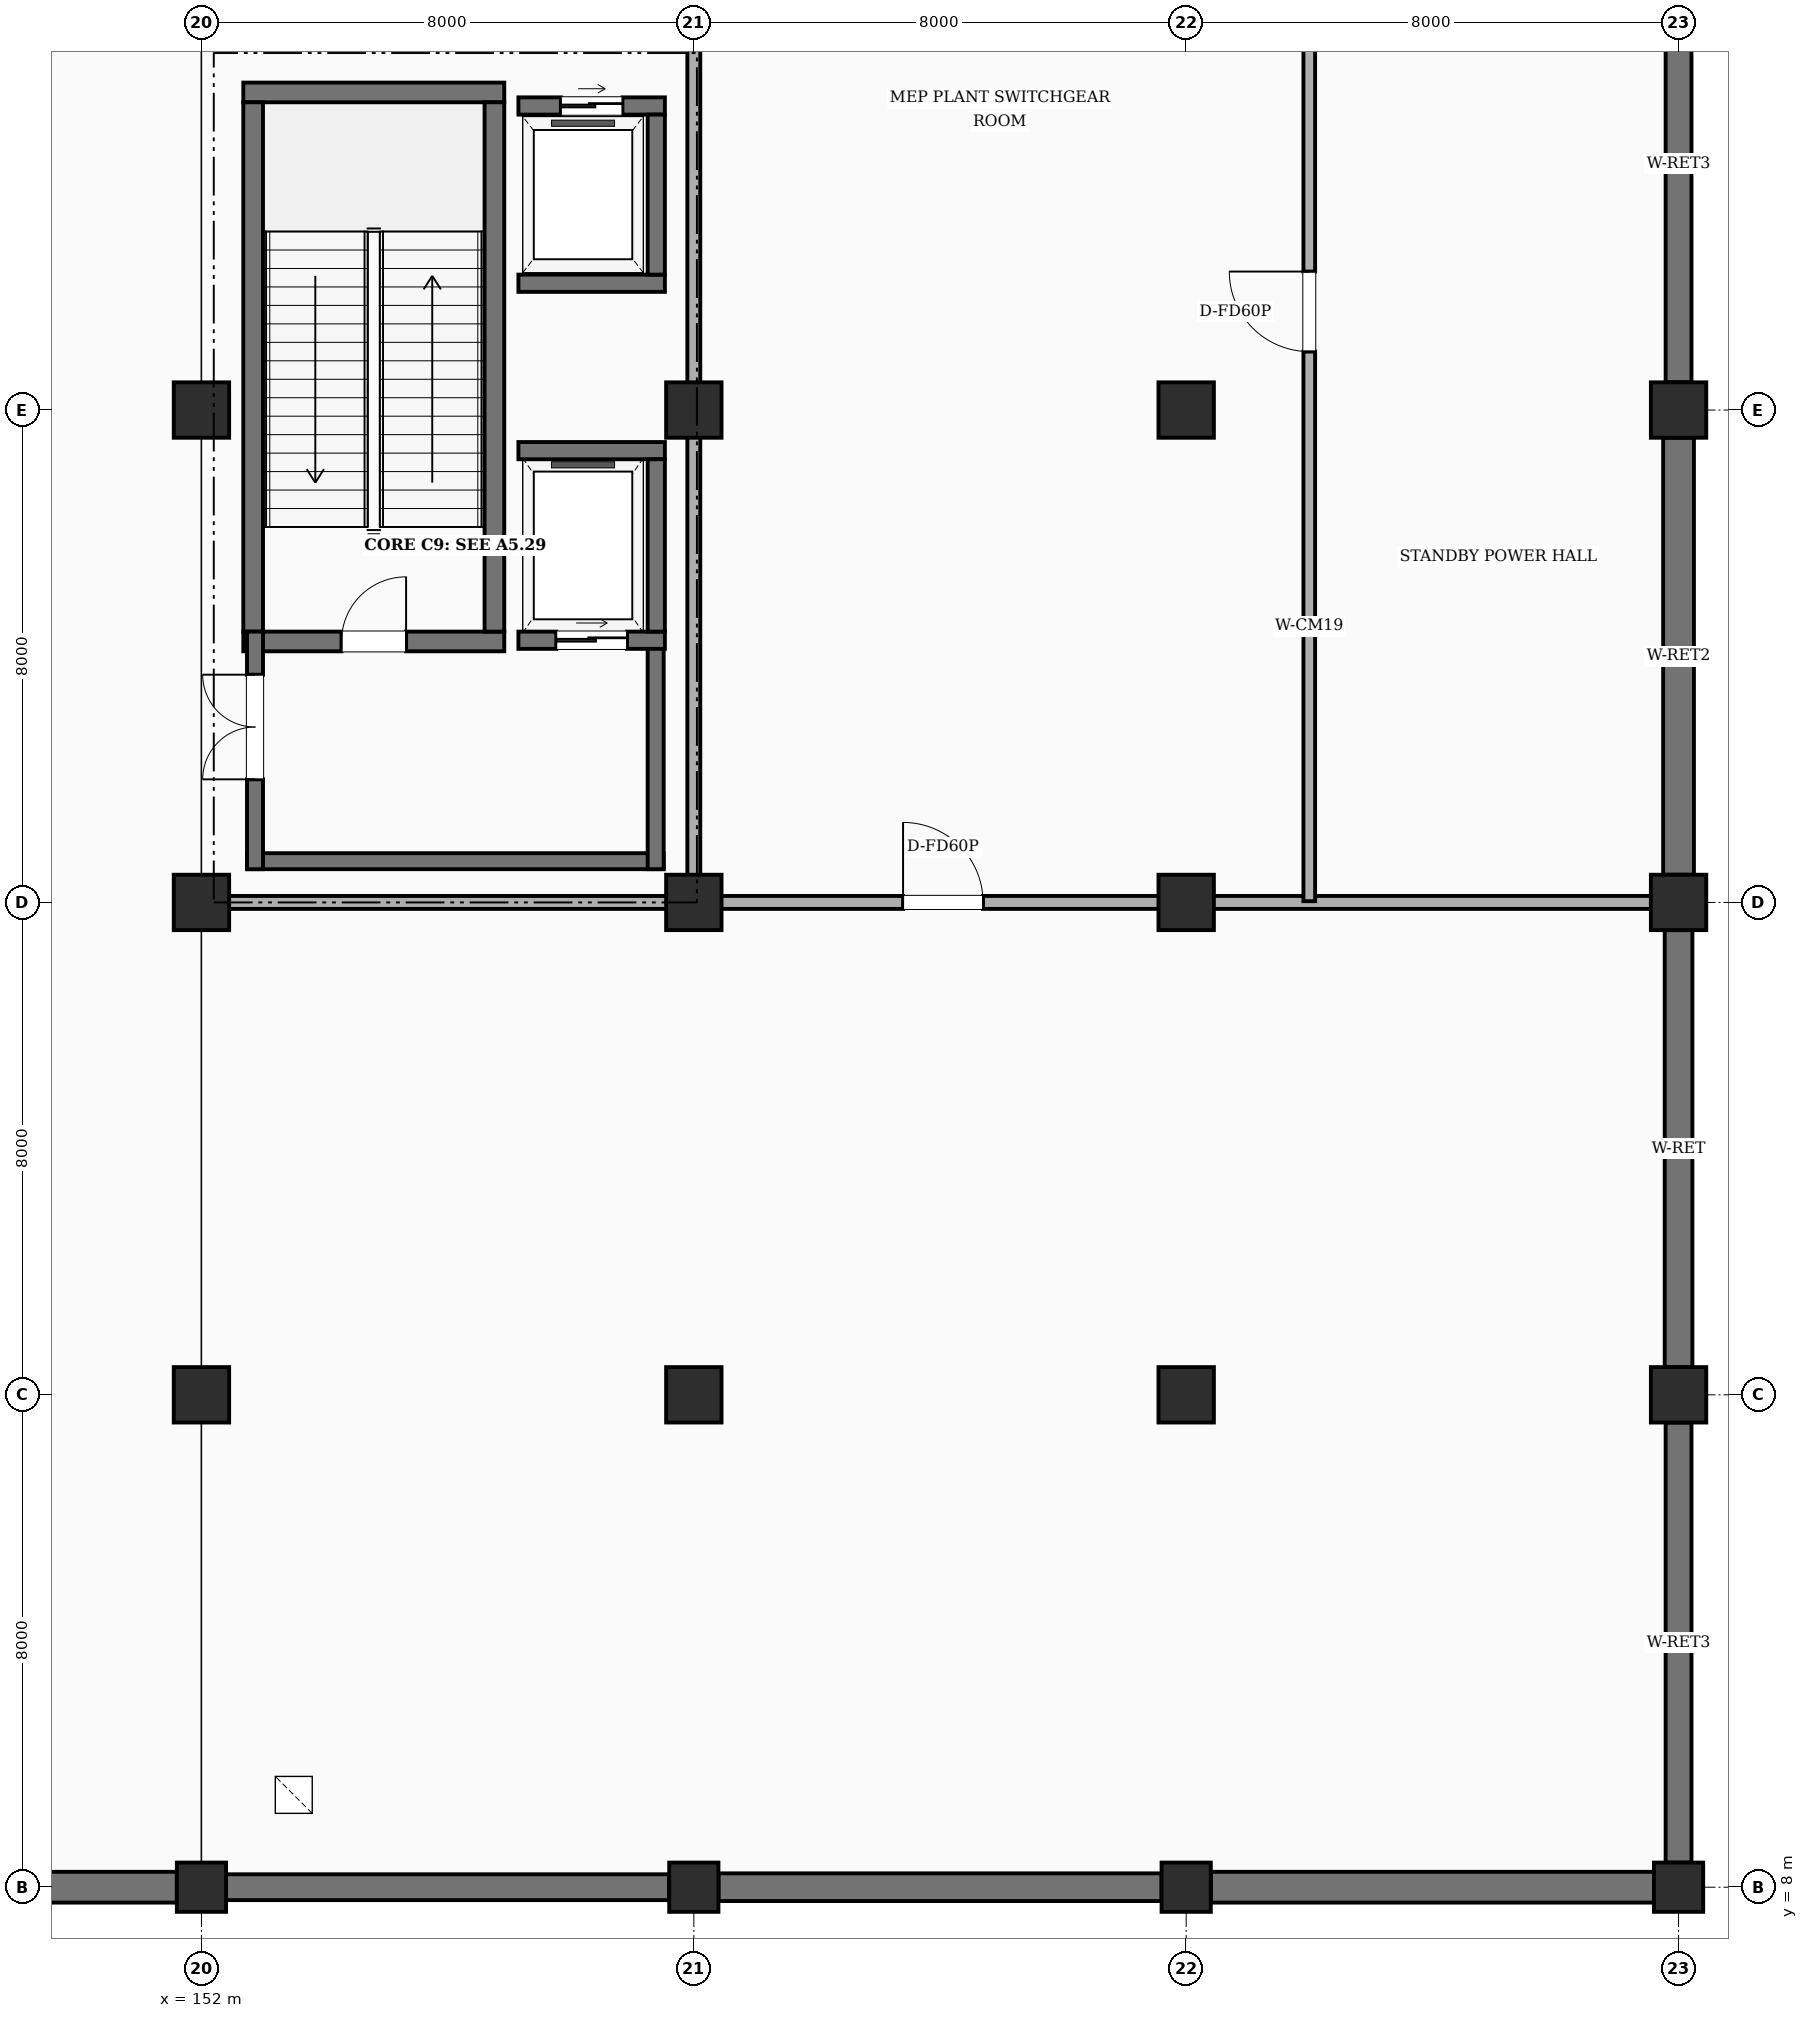
"""IFC4 building model, lengths in metres.
Left out: names, types, materials, properties, quantities, classifications, styles, units other than length and angle.
Written with IfcOpenShell. Run it as: python <this file> out.ifc"""

import sys

from ifc_helpers import new_model, si_unit, direction, frame, frame_2d, origin, origin_2d, place, context, subcontext, project, spatial, rectangle, extrude, element, fill, save


model = new_model("IFC4")
c1 = context("Model", 3, precision=1e-05, world=origin(), true_north=direction((0.0, 1.0)))
c2 = subcontext(c1, "Body", "Model", "MODEL_VIEW")
j1 = project(units=[si_unit("LENGTHUNIT", "METRE"), si_unit("PLANEANGLEUNIT", "RADIAN")], contexts=[c1])
p1 = place(None, origin())
s1 = spatial("IfcSite", under=j1, at=p1, CompositionType="ELEMENT")
p2 = place(p1, origin())
s2 = spatial("IfcBuilding", under=s1, at=p2, CompositionType="ELEMENT")
p3 = place(p2, frame((0.0, 0.0, -5.4)))
s3 = spatial("IfcBuildingStorey", under=s2, at=p3, CompositionType="ELEMENT", Elevation=-5.4)
p4 = place(p3, frame((152.0, 8.0, -0.4), z_axis=(0.0, 0.0, 1.0), x_axis=(1.0, 0.0, 0.0)))
e1 = element("IfcColumn", 1, at=p4, inside=s3, PredefinedType="COLUMN", context=c2, shape_type="SweptSolid", body=[
    extrude(rectangle(XDim=0.8, YDim=0.8, at=origin_2d()), origin(), (0.0, 0.0, 1.0), 5.8),
])
for number, where, z_axis, x_axis in (
    (2, (152.0, 16.0, -0.4), (0.0, 0.0, 1.0), (1.0, 0.0, 0.0)),
    (3, (152.0, 24.0, -0.4), (0.0, 0.0, 1.0), (1.0, 0.0, 0.0)),
    (4, (152.0, 32.0, -0.4), (0.0, 0.0, 1.0), (1.0, 0.0, 0.0)),
):
    element("IfcColumn", number, at=place(p3, frame(where, z_axis=z_axis, x_axis=x_axis)), inside=s3, PredefinedType="COLUMN", context=c2, shape_type="SweptSolid", body=[
        extrude(rectangle(XDim=0.9, YDim=0.9, at=origin_2d()), origin(), (0.0, 0.0, 1.0), 5.8),
    ])
p5 = place(p3, frame((160.0, 8.0, -0.4), z_axis=(0.0, 0.0, 1.0), x_axis=(1.0, 0.0, 0.0)))
e5 = element("IfcColumn", 5, at=p5, inside=s3, PredefinedType="COLUMN", context=c2, shape_type="SweptSolid", body=[
    extrude(rectangle(XDim=0.8, YDim=0.8, at=origin_2d()), origin(), (0.0, 0.0, 1.0), 5.8),
])
for number, where, z_axis, x_axis in (
    (6, (160.0, 16.0, -0.4), (0.0, 0.0, 1.0), (1.0, 0.0, 0.0)),
    (7, (160.0, 24.0, -0.4), (0.0, 0.0, 1.0), (1.0, 0.0, 0.0)),
    (8, (160.0, 32.0, -0.4), (0.0, 0.0, 1.0), (1.0, 0.0, 0.0)),
):
    element("IfcColumn", number, at=place(p3, frame(where, z_axis=z_axis, x_axis=x_axis)), inside=s3, PredefinedType="COLUMN", context=c2, shape_type="SweptSolid", body=[
        extrude(rectangle(XDim=0.9, YDim=0.9, at=origin_2d()), origin(), (0.0, 0.0, 1.0), 5.8),
    ])
p6 = place(p3, frame((168.0, 8.0, -0.4), z_axis=(0.0, 0.0, 1.0), x_axis=(1.0, 0.0, 0.0)))
e9 = element("IfcColumn", 9, at=p6, inside=s3, PredefinedType="COLUMN", context=c2, shape_type="SweptSolid", body=[
    extrude(rectangle(XDim=0.8, YDim=0.8, at=origin_2d()), origin(), (0.0, 0.0, 1.0), 5.8),
])
for number, where, z_axis, x_axis in (
    (10, (168.0, 16.0, -0.4), (0.0, 0.0, 1.0), (1.0, 0.0, 0.0)),
    (11, (168.0, 24.0, -0.4), (0.0, 0.0, 1.0), (1.0, 0.0, 0.0)),
    (12, (168.0, 32.0, -0.4), (0.0, 0.0, 1.0), (1.0, 0.0, 0.0)),
):
    element("IfcColumn", number, at=place(p3, frame(where, z_axis=z_axis, x_axis=x_axis)), inside=s3, PredefinedType="COLUMN", context=c2, shape_type="SweptSolid", body=[
        extrude(rectangle(XDim=0.9, YDim=0.9, at=origin_2d()), origin(), (0.0, 0.0, 1.0), 5.8),
    ])
p7 = place(p3, frame((176.0, 8.0, -0.4), z_axis=(0.0, 0.0, 1.0), x_axis=(1.0, 0.0, 0.0)))
e13 = element("IfcColumn", 13, at=p7, inside=s3, PredefinedType="COLUMN", context=c2, shape_type="SweptSolid", body=[
    extrude(rectangle(XDim=0.8, YDim=0.8, at=origin_2d()), origin(), (0.0, 0.0, 1.0), 5.8),
])
for number, where, z_axis, x_axis in (
    (14, (176.0, 16.0, -0.4), (0.0, 0.0, 1.0), (1.0, 0.0, 0.0)),
    (15, (176.0, 24.0, -0.4), (0.0, 0.0, 1.0), (1.0, 0.0, 0.0)),
    (16, (176.0, 32.0, -0.4), (0.0, 0.0, 1.0), (1.0, 0.0, 0.0)),
):
    element("IfcColumn", number, at=place(p3, frame(where, z_axis=z_axis, x_axis=x_axis)), inside=s3, PredefinedType="COLUMN", context=c2, shape_type="SweptSolid", body=[
        extrude(rectangle(XDim=0.9, YDim=0.9, at=origin_2d()), origin(), (0.0, 0.0, 1.0), 5.8),
    ])
p8 = place(p3, frame((176.0, 8.4, 0.0), z_axis=(0.0, 0.0, 1.0), x_axis=(0.0, 1.0, 0.0)))
e17 = element("IfcWall", 17, at=p8, inside=s3, PredefinedType="USERDEFINED", context=c2, shape_type="SweptSolid", body=[
    extrude(rectangle(XDim=7.15, YDim=0.42, at=frame_2d((3.575, 0.0))), origin(), (0.0, 0.0, 1.0), 4.36),
])
p9 = place(p3, frame((176.0, 16.45, 0.0), z_axis=(0.0, 0.0, 1.0), x_axis=(0.0, 1.0, 0.0)))
e18 = element("IfcWall", 18, at=p9, inside=s3, PredefinedType="USERDEFINED", context=c2, shape_type="SweptSolid", body=[
    extrude(rectangle(XDim=7.1, YDim=0.45, at=frame_2d((3.55, 0.0))), origin(), (0.0, 0.0, 1.0), 4.36),
])
p10 = place(p3, frame((176.0, 24.45, 0.0), z_axis=(0.0, 0.0, 1.0), x_axis=(0.0, 1.0, 0.0)))
e19 = element("IfcWall", 19, at=p10, inside=s3, PredefinedType="USERDEFINED", context=c2, shape_type="SweptSolid", body=[
    extrude(rectangle(XDim=7.1, YDim=0.5, at=frame_2d((3.55, 0.0))), origin(), (0.0, 0.0, 1.0), 4.36),
])
p11 = place(p3, frame((176.0, 32.45, 0.0), z_axis=(0.0, 0.0, 1.0), x_axis=(0.0, 1.0, 0.0)))
e20 = element("IfcWall", 20, at=p11, inside=s3, PredefinedType="USERDEFINED", context=c2, shape_type="SweptSolid", body=[
    extrude(rectangle(XDim=7.1, YDim=0.42, at=frame_2d((3.55, 0.0))), origin(), (0.0, 0.0, 1.0), 4.36),
])
p12 = place(p3, frame((144.4, 8.0, 0.0), z_axis=(0.0, 0.0, 1.0), x_axis=(1.0, 0.0, 0.0)))
e21 = element("IfcWall", 21, at=p12, inside=s3, PredefinedType="USERDEFINED", context=c2, shape_type="SweptSolid", body=[
    extrude(rectangle(XDim=7.2, YDim=0.5, at=frame_2d((3.6, 0.0))), origin(), (0.0, 0.0, 1.0), 5.0),
])
p13 = place(p3, frame((152.4, 8.0, 0.0), z_axis=(0.0, 0.0, 1.0), x_axis=(1.0, 0.0, 0.0)))
e22 = element("IfcWall", 22, at=p13, inside=s3, PredefinedType="USERDEFINED", context=c2, shape_type="SweptSolid", body=[
    extrude(rectangle(XDim=7.2, YDim=0.42, at=frame_2d((3.6, 0.0))), origin(), (0.0, 0.0, 1.0), 4.36),
])
p14 = place(p3, frame((160.4, 8.0, 0.0), z_axis=(0.0, 0.0, 1.0), x_axis=(1.0, 0.0, 0.0)))
e23 = element("IfcWall", 23, at=p14, inside=s3, PredefinedType="USERDEFINED", context=c2, shape_type="SweptSolid", body=[
    extrude(rectangle(XDim=7.2, YDim=0.45, at=frame_2d((3.6, 0.0))), origin(), (0.0, 0.0, 1.0), 4.36),
])
p15 = place(p3, frame((168.4, 8.0, 0.0), z_axis=(0.0, 0.0, 1.0), x_axis=(1.0, 0.0, 0.0)))
e24 = element("IfcWall", 24, at=p15, inside=s3, PredefinedType="USERDEFINED", context=c2, shape_type="SweptSolid", body=[
    extrude(rectangle(XDim=7.2, YDim=0.5, at=frame_2d((3.6, 0.0))), origin(), (0.0, 0.0, 1.0), 4.36),
])
p16 = place(p3, frame((152.68, 28.24, 0.0), z_axis=(0.0, 0.0, 1.0), x_axis=(1.0, 0.0, 0.0)))
e25 = element("IfcWall", 25, at=p16, inside=s3, PredefinedType="SHEAR", context=c2, shape_type="SweptSolid", body=[
    extrude(rectangle(XDim=4.24, YDim=0.32, at=frame_2d((2.12, 0.0))), origin(), (0.0, 0.0, 1.0), 5.4),
])
p17 = place(p16, frame((1.595, 0.0, 0.0)))
e26 = element("IfcOpeningElement", 26, at=p17, cuts=e25, PredefinedType="OPENING", context=c2, shape_type="SweptSolid", body=[
    extrude(rectangle(XDim=1.05, YDim=2.15, at=frame_2d((0.525, 1.075))), frame((0.0, 0.17, 0.0), z_axis=(0.0, -1.0, 0.0), x_axis=(1.0, 0.0, 0.0)), (0.0, 0.0, 1.0), 0.34),
])
p18 = place(p3, frame((152.68, 37.16, 0.0), z_axis=(0.0, 0.0, 1.0), x_axis=(1.0, 0.0, 0.0)))
e27 = element("IfcWall", 27, at=p18, inside=s3, PredefinedType="SHEAR", context=c2, shape_type="SweptSolid", body=[
    extrude(rectangle(XDim=4.24, YDim=0.32, at=frame_2d((2.12, 0.0))), origin(), (0.0, 0.0, 1.0), 5.4),
])
for number, where, z_axis, x_axis in (
    (28, (152.84, 28.4, 0.0), (0.0, 0.0, 1.0), (0.0, 1.0, 0.0)),
    (29, (156.76, 28.4, 0.0), (0.0, 0.0, 1.0), (0.0, 1.0, 0.0)),
):
    element("IfcWall", number, at=place(p3, frame(where, z_axis=z_axis, x_axis=x_axis)), inside=s3, PredefinedType="SHEAR", context=c2, shape_type="SweptSolid", body=[
        extrude(rectangle(XDim=8.6, YDim=0.32, at=frame_2d((4.3, 0.0))), origin(), (0.0, 0.0, 1.0), 5.4),
    ])
p19 = place(p3, frame((159.51, 24.67, 0.0), z_axis=(0.0, 0.0, 1.0), x_axis=(-1.0, 0.0, 0.0)))
e30 = element("IfcWall", 30, at=p19, inside=s3, PredefinedType="SHEAR", context=c2, shape_type="SweptSolid", body=[
    extrude(rectangle(XDim=6.77, YDim=0.26, at=frame_2d((3.385, 0.0))), origin(), (0.0, 0.0, 1.0), 5.4),
])
p20 = place(p3, frame((152.87, 24.54, 0.0), z_axis=(0.0, 0.0, 1.0), x_axis=(0.0, 1.0, 0.0)))
e31 = element("IfcWall", 31, at=p20, inside=s3, PredefinedType="SHEAR", context=c2, shape_type="SweptSolid", body=[
    extrude(rectangle(XDim=3.86, YDim=0.26, at=frame_2d((1.93, 0.0))), origin(), (0.0, 0.0, 1.0), 5.4),
])
p21 = place(p20, frame((1.46, 0.0, 0.0)))
e32 = element("IfcOpeningElement", 32, at=p21, cuts=e31, PredefinedType="OPENING", context=c2, shape_type="SweptSolid", body=[
    extrude(rectangle(XDim=1.7, YDim=2.2, at=frame_2d((0.85, 1.1))), frame((0.0, 0.14, 0.0), z_axis=(0.0, -1.0, 0.0), x_axis=(1.0, 0.0, 0.0)), (0.0, 0.0, 1.0), 0.28),
])
p22 = place(p3, frame((159.38, 24.54, 0.0), z_axis=(0.0, 0.0, 1.0), x_axis=(0.0, 1.0, 0.0)))
e33 = element("IfcWall", 33, at=p22, inside=s3, PredefinedType="SHEAR", context=c2, shape_type="SweptSolid", body=[
    extrude(rectangle(XDim=3.86, YDim=0.26, at=frame_2d((1.93, 0.0))), origin(), (0.0, 0.0, 1.0), 5.4),
])
p23 = place(p3, frame((157.15, 28.26, 0.0), z_axis=(0.0, 0.0, 1.0), x_axis=(1.0, 0.0, 0.0)))
e34 = element("IfcWall", 34, at=p23, inside=s3, PredefinedType="SHEAR", context=c2, shape_type="SweptSolid", body=[
    extrude(rectangle(XDim=2.38, YDim=0.28, at=frame_2d((1.19, 0.0))), origin(), (0.0, 0.0, 1.0), 5.4),
])
p24 = place(p23, frame((0.615, 0.0, 0.0)))
e35 = element("IfcOpeningElement", 35, at=p24, cuts=e34, PredefinedType="OPENING", context=c2, shape_type="SweptSolid", body=[
    extrude(rectangle(XDim=1.15, YDim=2.2, at=frame_2d((0.575, 1.1))), frame((0.0, 0.15, 0.0), z_axis=(0.0, -1.0, 0.0), x_axis=(1.0, 0.0, 0.0)), (0.0, 0.0, 1.0), 0.3),
])
p25 = place(p3, frame((157.15, 31.34, 0.0), z_axis=(0.0, 0.0, 1.0), x_axis=(1.0, 0.0, 0.0)))
e36 = element("IfcWall", 36, at=p25, inside=s3, PredefinedType="SHEAR", context=c2, shape_type="SweptSolid", body=[
    extrude(rectangle(XDim=2.38, YDim=0.28, at=frame_2d((1.19, 0.0))), origin(), (0.0, 0.0, 1.0), 5.4),
])
p26 = place(p3, frame((159.39, 28.4, 0.0), z_axis=(0.0, 0.0, 1.0), x_axis=(0.0, 1.0, 0.0)))
e37 = element("IfcWall", 37, at=p26, inside=s3, PredefinedType="SHEAR", context=c2, shape_type="SweptSolid", body=[
    extrude(rectangle(XDim=2.8, YDim=0.28, at=frame_2d((1.4, 0.0))), origin(), (0.0, 0.0, 1.0), 5.4),
])
p27 = place(p3, frame((157.15, 34.06, 0.0), z_axis=(0.0, 0.0, 1.0), x_axis=(1.0, 0.0, 0.0)))
e38 = element("IfcWall", 38, at=p27, inside=s3, PredefinedType="SHEAR", context=c2, shape_type="SweptSolid", body=[
    extrude(rectangle(XDim=2.38, YDim=0.28, at=frame_2d((1.19, 0.0))), origin(), (0.0, 0.0, 1.0), 5.4),
])
p28 = place(p3, frame((157.15, 36.94, 0.0), z_axis=(0.0, 0.0, 1.0), x_axis=(1.0, 0.0, 0.0)))
e39 = element("IfcWall", 39, at=p28, inside=s3, PredefinedType="SHEAR", context=c2, shape_type="SweptSolid", body=[
    extrude(rectangle(XDim=2.38, YDim=0.28, at=frame_2d((1.19, 0.0))), origin(), (0.0, 0.0, 1.0), 5.4),
])
p29 = place(p28, frame((0.69, 0.0, 0.0)))
e40 = element("IfcOpeningElement", 40, at=p29, cuts=e39, PredefinedType="OPENING", context=c2, shape_type="SweptSolid", body=[
    extrude(rectangle(XDim=1.0, YDim=2.15, at=frame_2d((0.5, 1.075))), frame((0.0, 0.15, 0.0), z_axis=(0.0, -1.0, 0.0), x_axis=(1.0, 0.0, 0.0)), (0.0, 0.0, 1.0), 0.3),
])
p30 = place(p3, frame((159.39, 34.2, 0.0), z_axis=(0.0, 0.0, 1.0), x_axis=(0.0, 1.0, 0.0)))
e41 = element("IfcWall", 41, at=p30, inside=s3, PredefinedType="SHEAR", context=c2, shape_type="SweptSolid", body=[
    extrude(rectangle(XDim=2.6, YDim=0.28, at=frame_2d((1.3, 0.0))), origin(), (0.0, 0.0, 1.0), 5.4),
])
p31 = place(p3, frame((152.22, 24.0, 0.0), z_axis=(0.0, 0.0, 1.0), x_axis=(1.0, 0.0, 0.0)))
e42 = element("IfcWall", 42, at=p31, inside=s3, PredefinedType="SOLIDWALL", context=c2, shape_type="SweptSolid", body=[
    extrude(rectangle(XDim=23.66, YDim=0.21, at=frame_2d((11.83, 0.0))), origin(), (0.0, 0.0, 1.0), 4.11),
])
p32 = place(p31, frame((11.18, 0.0, 0.0)))
e43 = element("IfcOpeningElement", 43, at=p32, cuts=e42, PredefinedType="OPENING", context=c2, shape_type="SweptSolid", body=[
    extrude(rectangle(XDim=1.3, YDim=2.2, at=frame_2d((0.65, 1.1))), frame((0.0, 0.115, 0.0), z_axis=(0.0, -1.0, 0.0), x_axis=(1.0, 0.0, 0.0)), (0.0, 0.0, 1.0), 0.23),
])
p33 = place(p3, frame((170.0, 24.02, 0.0), z_axis=(0.0, 0.0, 1.0), x_axis=(0.0, 1.0, 0.0)))
e44 = element("IfcWall", 44, at=p33, inside=s3, PredefinedType="SOLIDWALL", context=c2, shape_type="SweptSolid", body=[
    extrude(rectangle(XDim=19.16, YDim=0.19, at=frame_2d((9.58, 0.0))), origin(), (0.0, 0.0, 1.0), 4.11),
])
p34 = place(p33, frame((8.93, 0.0, 0.0)))
e45 = element("IfcOpeningElement", 45, at=p34, cuts=e44, PredefinedType="OPENING", context=c2, shape_type="SweptSolid", body=[
    extrude(rectangle(XDim=1.3, YDim=2.2, at=frame_2d((0.65, 1.1))), frame((0.0, 0.105, 0.0), z_axis=(0.0, -1.0, 0.0), x_axis=(1.0, 0.0, 0.0)), (0.0, 0.0, 1.0), 0.21),
])
p35 = place(p3, frame((160.0, 24.02, 0.0), z_axis=(0.0, 0.0, 1.0), x_axis=(0.0, 1.0, 0.0)))
e46 = element("IfcWall", 46, at=p35, inside=s3, PredefinedType="SOLIDWALL", context=c2, shape_type="SweptSolid", body=[
    extrude(rectangle(XDim=19.16, YDim=0.21, at=frame_2d((9.58, 0.0))), origin(), (0.0, 0.0, 1.0), 4.11),
])
p36 = place(p17, origin())
e47 = element("IfcDoor", 47, at=p36, inside=s3, OperationType="SINGLE_SWING_RIGHT", PredefinedType="DOOR", context=c2, shape_type="SweptSolid", body=[
    extrude(rectangle(XDim=1.05, YDim=2.15, at=frame_2d((0.525, 1.075))), frame((0.0, 0.025, 0.0), z_axis=(0.0, -1.0, 0.0), x_axis=(1.0, 0.0, 0.0)), (0.0, 0.0, 1.0), 0.05),
])
fill(e26, e47)
p37 = place(p21, origin())
e48 = element("IfcDoor", 48, at=p37, inside=s3, OperationType="DOUBLE_DOOR_SINGLE_SWING", PredefinedType="DOOR", context=c2, shape_type="SweptSolid", body=[
    extrude(rectangle(XDim=1.7, YDim=2.2, at=frame_2d((0.85, 1.1))), frame((0.0, 0.025, 0.0), z_axis=(0.0, -1.0, 0.0), x_axis=(1.0, 0.0, 0.0)), (0.0, 0.0, 1.0), 0.05),
])
fill(e32, e48)
p38 = place(p24, origin())
e49 = element("IfcDoor", 49, at=p38, inside=s3, OperationType="SLIDING_TO_LEFT", PredefinedType="DOOR", context=c2, shape_type="SweptSolid", body=[
    extrude(rectangle(XDim=1.15, YDim=2.2, at=frame_2d((0.575, 1.1))), frame((0.0, 0.025, 0.0), z_axis=(0.0, -1.0, 0.0), x_axis=(1.0, 0.0, 0.0)), (0.0, 0.0, 1.0), 0.05),
])
fill(e35, e49)
p39 = place(p29, origin())
e50 = element("IfcDoor", 50, at=p39, inside=s3, OperationType="SLIDING_TO_LEFT", PredefinedType="DOOR", context=c2, shape_type="SweptSolid", body=[
    extrude(rectangle(XDim=1.0, YDim=2.15, at=frame_2d((0.5, 1.075))), frame((0.0, 0.025, 0.0), z_axis=(0.0, -1.0, 0.0), x_axis=(1.0, 0.0, 0.0)), (0.0, 0.0, 1.0), 0.05),
])
fill(e40, e50)
p40 = place(p32, origin())
e51 = element("IfcDoor", 51, at=p40, inside=s3, OperationType="SINGLE_SWING_LEFT", PredefinedType="DOOR", context=c2, shape_type="SweptSolid", body=[
    extrude(rectangle(XDim=1.3, YDim=2.2, at=frame_2d((0.65, 1.1))), frame((0.0, 0.025, 0.0), z_axis=(0.0, -1.0, 0.0), x_axis=(1.0, 0.0, 0.0)), (0.0, 0.0, 1.0), 0.05),
])
fill(e43, e51)
p41 = place(p34, origin())
e52 = element("IfcDoor", 52, at=p41, inside=s3, OperationType="SINGLE_SWING_RIGHT", PredefinedType="DOOR", context=c2, shape_type="SweptSolid", body=[
    extrude(rectangle(XDim=1.3, YDim=2.2, at=frame_2d((0.65, 1.1))), frame((0.0, 0.025, 0.0), z_axis=(0.0, -1.0, 0.0), x_axis=(1.0, 0.0, 0.0)), (0.0, 0.0, 1.0), 0.05),
])
fill(e45, e52)
save(model, sys.argv[1])
